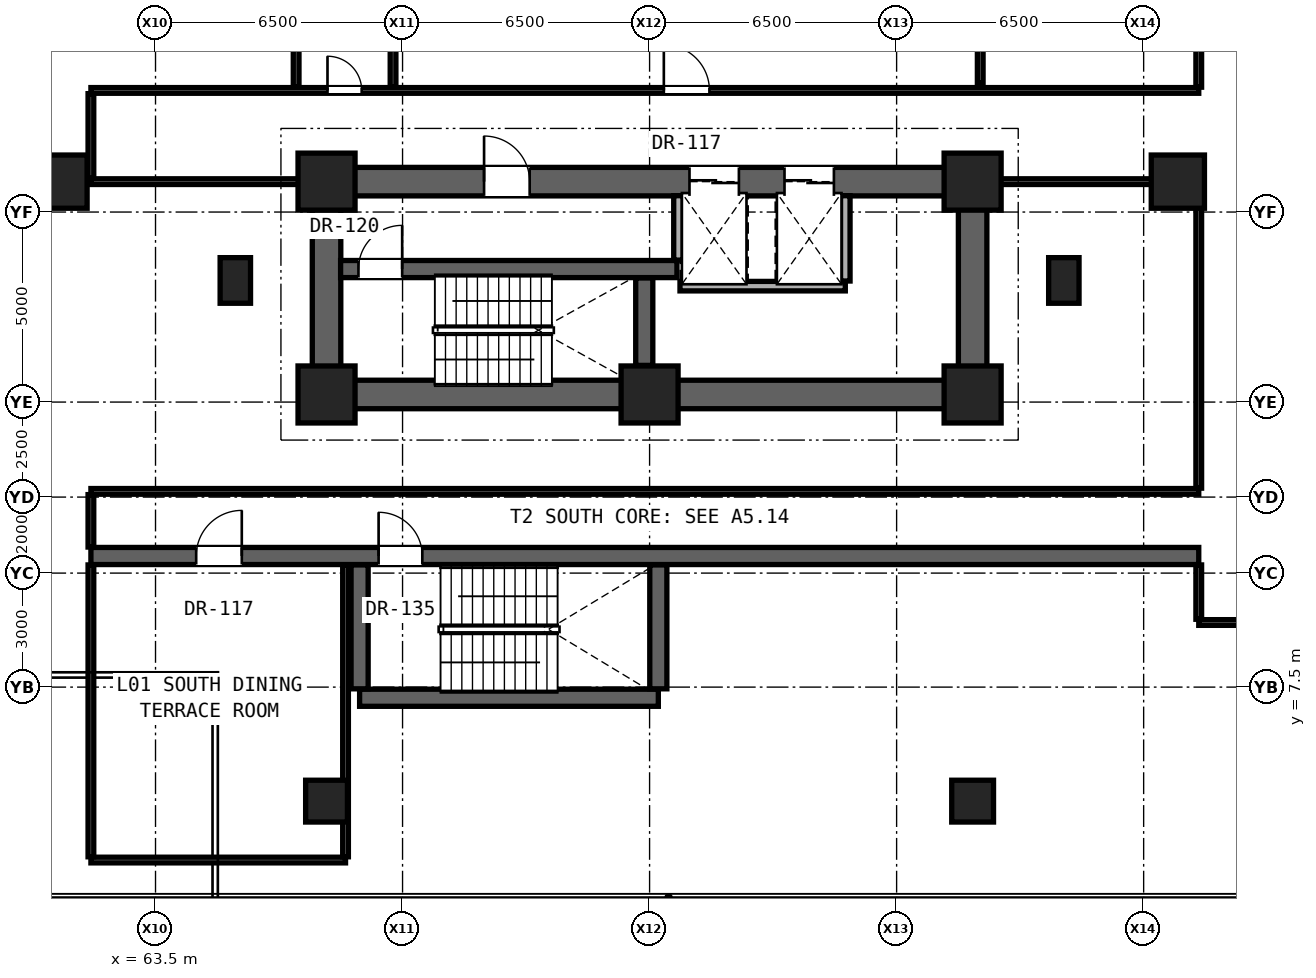
"""IFC4 building model, lengths in metres.
Left out: names, types, materials, properties, quantities, classifications, styles, units other than length and angle.
Written with IfcOpenShell. Run it as: python <this file> out.ifc"""

import sys

from ifc_helpers import new_model, si_unit, direction, frame, frame_2d, origin, origin_2d, place, context, subcontext, project, spatial, rectangle, hollow_rectangle, extrude, element, fill, save


model = new_model("IFC4")
c1 = context("Model", 3, precision=1e-05, world=origin(), true_north=direction((0.0, 1.0)))
c2 = subcontext(c1, "Body", "Model", "MODEL_VIEW")
j1 = project(units=[si_unit("LENGTHUNIT", "METRE"), si_unit("PLANEANGLEUNIT", "RADIAN")], contexts=[c1])
p1 = place(None, origin())
s1 = spatial("IfcSite", under=j1, at=p1, CompositionType="ELEMENT")
p2 = place(p1, origin())
s2 = spatial("IfcBuilding", under=s1, at=p2, CompositionType="ELEMENT")
p3 = place(p2, frame((0.0, 0.0, 5.2)))
s3 = spatial("IfcBuildingStorey", under=s2, at=p3, CompositionType="ELEMENT", Elevation=5.2)
for number, where, z_axis, x_axis in (
    (1, (68.0, 15.2, 0.0), (0.0, 0.0, 1.0), (1.0, 0.0, 0.0)),
    (2, (76.5, 15.2, 0.0), (0.0, 0.0, 1.0), (1.0, 0.0, 0.0)),
    (3, (85.0, 15.2, 0.0), (0.0, 0.0, 1.0), (1.0, 0.0, 0.0)),
    (4, (68.0, 20.8, 0.0), (0.0, 0.0, 1.0), (1.0, 0.0, 0.0)),
    (5, (85.0, 20.8, 0.0), (0.0, 0.0, 1.0), (1.0, 0.0, 0.0)),
):
    element("IfcColumn", number, at=place(p3, frame(where, z_axis=z_axis, x_axis=x_axis)), inside=s3, PredefinedType="COLUMN", context=c2, shape_type="SweptSolid", body=[
        extrude(rectangle(XDim=1.5, YDim=1.5, at=origin_2d()), origin(), (0.0, 0.0, 1.0), 4.3),
    ])
for number, where, z_axis, x_axis in (
    (6, (61.0, 20.8, 0.0), (0.0, 0.0, 1.0), (1.0, 0.0, 0.0)),
    (7, (90.4, 20.8, 0.0), (0.0, 0.0, 1.0), (1.0, 0.0, 0.0)),
):
    element("IfcColumn", number, at=place(p3, frame(where, z_axis=z_axis, x_axis=x_axis)), inside=s3, PredefinedType="COLUMN", context=c2, shape_type="SweptSolid", body=[
        extrude(hollow_rectangle(XDim=1.4, YDim=1.4, WallThickness=0.08, at=origin_2d()), origin(), (0.0, 0.0, 1.0), 4.3),
    ])
for number, where, z_axis, x_axis in (
    (8, (65.6, 18.2, 0.0), (0.0, 0.0, 1.0), (1.0, 0.0, 0.0)),
    (9, (87.4, 18.2, 0.0), (0.0, 0.0, 1.0), (1.0, 0.0, 0.0)),
):
    element("IfcColumn", number, at=place(p3, frame(where, z_axis=z_axis, x_axis=x_axis)), inside=s3, PredefinedType="PILASTER", context=c2, shape_type="SweptSolid", body=[
        extrude(rectangle(XDim=0.8, YDim=1.2, at=origin_2d()), origin(), (0.0, 0.0, 1.0), 4.3),
    ])
p4 = place(p3, frame((68.0, 15.2, 0.0), z_axis=(0.0, 0.0, 1.0), x_axis=(1.0, 0.0, 0.0)))
e10 = element("IfcWall", 10, at=p4, inside=s3, PredefinedType="SHEAR", context=c2, shape_type="SweptSolid", body=[
    extrude(rectangle(XDim=17.0, YDim=0.75, at=frame_2d((8.5, 0.0))), origin(), (0.0, 0.0, 1.0), 3.98),
])
for number, where, z_axis, x_axis in (
    (11, (68.0, 15.2, 0.0), (0.0, 0.0, 1.0), (0.0, 1.0, 0.0)),
    (12, (85.0, 15.2, 0.0), (0.0, 0.0, 1.0), (0.0, 1.0, 0.0)),
):
    element("IfcWall", number, at=place(p3, frame(where, z_axis=z_axis, x_axis=x_axis)), inside=s3, PredefinedType="SHEAR", context=c2, shape_type="SweptSolid", body=[
        extrude(rectangle(XDim=5.6, YDim=0.75, at=frame_2d((2.8, 0.0))), origin(), (0.0, 0.0, 1.0), 3.98),
    ])
p5 = place(p3, frame((68.0, 20.8, 0.0), z_axis=(0.0, 0.0, 1.0), x_axis=(1.0, 0.0, 0.0)))
e13 = element("IfcWall", 13, at=p5, inside=s3, PredefinedType="SHEAR", context=c2, shape_type="SweptSolid", body=[
    extrude(rectangle(XDim=17.0, YDim=0.75, at=frame_2d((8.5, 0.0))), origin(), (0.0, 0.0, 1.0), 3.98),
])
p6 = place(p5, frame((4.145, 0.0, 0.0)))
e14 = element("IfcOpeningElement", 14, at=p6, cuts=e13, PredefinedType="OPENING", context=c2, shape_type="SweptSolid", body=[
    extrude(rectangle(XDim=1.2, YDim=2.25, at=frame_2d((0.6, 1.125))), frame((0.0, 0.385, 0.0), z_axis=(0.0, -1.0, 0.0), x_axis=(1.0, 0.0, 0.0)), (0.0, 0.0, 1.0), 0.77),
])
p7 = place(p5, frame((9.55, 0.0, 0.0)))
e15 = element("IfcOpeningElement", 15, at=p7, cuts=e13, PredefinedType="OPENING", context=c2, shape_type="SweptSolid", body=[
    extrude(rectangle(XDim=1.3, YDim=2.3, at=frame_2d((0.65, 1.15))), frame((0.0, 0.385, 0.0), z_axis=(0.0, -1.0, 0.0), x_axis=(1.0, 0.0, 0.0)), (0.0, 0.0, 1.0), 0.77),
])
p8 = place(p5, frame((12.05, 0.0, 0.0)))
e16 = element("IfcOpeningElement", 16, at=p8, cuts=e13, PredefinedType="OPENING", context=c2, shape_type="SweptSolid", body=[
    extrude(rectangle(XDim=1.3, YDim=2.3, at=frame_2d((0.65, 1.15))), frame((0.0, 0.385, 0.0), z_axis=(0.0, -1.0, 0.0), x_axis=(1.0, 0.0, 0.0)), (0.0, 0.0, 1.0), 0.77),
])
for number, where, z_axis, x_axis in (
    (17, (68.0, 4.5, 0.0), (0.0, 0.0, 1.0), (1.0, 0.0, 0.0)),
    (18, (85.0, 4.5, 0.0), (0.0, 0.0, 1.0), (1.0, 0.0, 0.0)),
):
    element("IfcColumn", number, at=place(p3, frame(where, z_axis=z_axis, x_axis=x_axis)), inside=s3, PredefinedType="COLUMN", context=c2, shape_type="SweptSolid", body=[
        extrude(rectangle(XDim=1.1, YDim=1.1, at=origin_2d()), origin(), (0.0, 0.0, 1.0), 4.3),
    ])
p9 = place(p3, frame((61.8, 2.95, 0.0), z_axis=(0.0, 0.0, 1.0), x_axis=(1.0, 0.0, 0.0)))
e19 = element("IfcWall", 19, at=p9, inside=s3, PredefinedType="PARTITIONING", context=c2, shape_type="SweptSolid", body=[
    extrude(rectangle(XDim=6.7, YDim=0.15, at=frame_2d((3.35, 0.0))), origin(), (0.0, 0.0, 1.0), 3.98),
])
p10 = place(p3, frame((68.87, 7.22, 0.0), z_axis=(0.0, 0.0, 1.0), x_axis=(1.0, 0.0, 0.0)))
e20 = element("IfcWall", 20, at=p10, inside=s3, PredefinedType="SHEAR", context=c2, shape_type="SweptSolid", body=[
    extrude(rectangle(XDim=7.86, YDim=0.45, at=frame_2d((3.93, 0.0))), origin(), (0.0, 0.0, 1.0), 3.98),
])
p11 = place(p3, frame((90.95, 9.2, 0.0), z_axis=(0.0, 0.0, 1.0), x_axis=(1.0, 0.0, 0.0)))
e21 = element("IfcWall", 21, at=p11, inside=s3, PredefinedType="PARTITIONING", context=c2, shape_type="SweptSolid", body=[
    extrude(rectangle(XDim=1.7, YDim=0.15, at=frame_2d((0.85, 0.0))), origin(), (0.0, 0.0, 1.0), 3.98),
])
p12 = place(p3, frame((61.8, 10.95, 0.0), z_axis=(0.0, 0.0, 1.0), x_axis=(1.0, 0.0, 0.0)))
e22 = element("IfcWall", 22, at=p12, inside=s3, PredefinedType="SHEAR", context=c2, shape_type="SweptSolid", body=[
    extrude(rectangle(XDim=29.15, YDim=0.45, at=frame_2d((14.575, 0.0))), origin(), (0.0, 0.0, 1.0), 3.98),
])
p13 = place(p12, frame((7.57, 0.0, 0.0)))
e23 = element("IfcOpeningElement", 23, at=p13, cuts=e22, PredefinedType="OPENING", context=c2, shape_type="SweptSolid", body=[
    extrude(rectangle(XDim=1.15, YDim=2.2, at=frame_2d((0.575, 1.1))), frame((0.0, 0.235, 0.0), z_axis=(0.0, -1.0, 0.0), x_axis=(1.0, 0.0, 0.0)), (0.0, 0.0, 1.0), 0.47),
])
p14 = place(p12, frame((2.77, 0.0, 0.0)))
e24 = element("IfcOpeningElement", 24, at=p14, cuts=e22, PredefinedType="OPENING", context=c2, shape_type="SweptSolid", body=[
    extrude(rectangle(XDim=1.2, YDim=2.25, at=frame_2d((0.6, 1.125))), frame((0.0, 0.235, 0.0), z_axis=(0.0, -1.0, 0.0), x_axis=(1.0, 0.0, 0.0)), (0.0, 0.0, 1.0), 0.47),
])
p15 = place(p3, frame((61.8, 12.65, 0.0), z_axis=(0.0, 0.0, 1.0), x_axis=(1.0, 0.0, 0.0)))
e25 = element("IfcWall", 25, at=p15, inside=s3, PredefinedType="PARTITIONING", context=c2, shape_type="SweptSolid", body=[
    extrude(rectangle(XDim=29.15, YDim=0.15, at=frame_2d((14.575, 0.0))), origin(), (0.0, 0.0, 1.0), 3.116),
])
p16 = place(p3, frame((77.3, 18.05, 0.0), z_axis=(0.0, 0.0, 1.0), x_axis=(1.0, 0.0, 0.0)))
e26 = element("IfcWall", 26, at=p16, inside=s3, PredefinedType="SOLIDWALL", context=c2, shape_type="SweptSolid", body=[
    extrude(rectangle(XDim=4.35, YDim=0.25, at=frame_2d((2.175, 0.0))), origin(), (0.0, 0.0, 1.0), 3.98),
])
p17 = place(p3, frame((68.37, 18.5, 0.0), z_axis=(0.0, 0.0, 1.0), x_axis=(1.0, 0.0, 0.0)))
e27 = element("IfcWall", 27, at=p17, inside=s3, PredefinedType="SHEAR", context=c2, shape_type="SweptSolid", body=[
    extrude(rectangle(XDim=8.85, YDim=0.45, at=frame_2d((4.425, 0.0))), origin(), (0.0, 0.0, 1.0), 3.98),
])
p18 = place(p17, frame((0.47, 0.0, 0.0)))
e28 = element("IfcOpeningElement", 28, at=p18, cuts=e27, PredefinedType="OPENING", context=c2, shape_type="SweptSolid", body=[
    extrude(rectangle(XDim=1.15, YDim=2.2, at=frame_2d((0.575, 1.1))), frame((0.0, 0.235, 0.0), z_axis=(0.0, -1.0, 0.0), x_axis=(1.0, 0.0, 0.0)), (0.0, 0.0, 1.0), 0.47),
])
p19 = place(p3, frame((61.8, 20.8, 0.0), z_axis=(0.0, 0.0, 1.0), x_axis=(1.0, 0.0, 0.0)))
e29 = element("IfcWall", 29, at=p19, inside=s3, PredefinedType="PARTITIONING", context=c2, shape_type="SweptSolid", body=[
    extrude(rectangle(XDim=5.83, YDim=0.15, at=frame_2d((2.915, 0.0))), origin(), (0.0, 0.0, 1.0), 2.872),
])
p20 = place(p3, frame((85.37, 20.8, 0.0), z_axis=(0.0, 0.0, 1.0), x_axis=(1.0, 0.0, 0.0)))
e30 = element("IfcWall", 30, at=p20, inside=s3, PredefinedType="PARTITIONING", context=c2, shape_type="SweptSolid", body=[
    extrude(rectangle(XDim=5.58, YDim=0.15, at=frame_2d((2.79, 0.0))), origin(), (0.0, 0.0, 1.0), 2.872),
])
p21 = place(p3, frame((61.8, 23.2, 0.0), z_axis=(0.0, 0.0, 1.0), x_axis=(1.0, 0.0, 0.0)))
e31 = element("IfcWall", 31, at=p21, inside=s3, PredefinedType="PARTITIONING", context=c2, shape_type="SweptSolid", body=[
    extrude(rectangle(XDim=29.15, YDim=0.15, at=frame_2d((14.575, 0.0))), origin(), (0.0, 0.0, 1.0), 3.045),
])
p22 = place(p21, frame((6.225, 0.0, 0.0)))
e32 = element("IfcOpeningElement", 32, at=p22, cuts=e31, PredefinedType="OPENING", context=c2, shape_type="SweptSolid", body=[
    extrude(rectangle(XDim=0.9, YDim=2.1, at=frame_2d((0.45, 1.05))), frame((0.0, 0.085, 0.0), z_axis=(0.0, -1.0, 0.0), x_axis=(1.0, 0.0, 0.0)), (0.0, 0.0, 1.0), 0.17),
])
p23 = place(p21, frame((15.075, 0.0, 0.0)))
e33 = element("IfcOpeningElement", 33, at=p23, cuts=e31, PredefinedType="OPENING", context=c2, shape_type="SweptSolid", body=[
    extrude(rectangle(XDim=1.2, YDim=2.25, at=frame_2d((0.6, 1.125))), frame((0.0, 0.085, 0.0), z_axis=(0.0, -1.0, 0.0), x_axis=(1.0, 0.0, 0.0)), (0.0, 0.0, 1.0), 0.17),
])
p24 = place(p3, frame((61.8, 3.035, 0.0), z_axis=(0.0, 0.0, 1.0), x_axis=(0.0, 1.0, 0.0)))
e34 = element("IfcWall", 34, at=p24, inside=s3, PredefinedType="PARTITIONING", context=c2, shape_type="SweptSolid", body=[
    extrude(rectangle(XDim=7.68, YDim=0.15, at=frame_2d((3.84, 0.0))), origin(), (0.0, 0.0, 1.0), 3.199),
])
p25 = place(p3, frame((61.8, 11.185, 0.0), z_axis=(0.0, 0.0, 1.0), x_axis=(0.0, 1.0, 0.0)))
e35 = element("IfcWall", 35, at=p25, inside=s3, PredefinedType="PARTITIONING", context=c2, shape_type="SweptSolid", body=[
    extrude(rectangle(XDim=1.38, YDim=0.15, at=frame_2d((0.69, 0.0))), origin(), (0.0, 0.0, 1.0), 3.98),
])
p26 = place(p3, frame((61.8, 20.885, 0.0), z_axis=(0.0, 0.0, 1.0), x_axis=(0.0, 1.0, 0.0)))
e36 = element("IfcWall", 36, at=p26, inside=s3, PredefinedType="PARTITIONING", context=c2, shape_type="SweptSolid", body=[
    extrude(rectangle(XDim=2.23, YDim=0.15, at=frame_2d((1.115, 0.0))), origin(), (0.0, 0.0, 1.0), 2.872),
])
p27 = place(p3, frame((67.2, 23.285, 0.0), z_axis=(0.0, 0.0, 1.0), x_axis=(0.0, 1.0, 0.0)))
e37 = element("IfcWall", 37, at=p27, inside=s3, PredefinedType="PARTITIONING", context=c2, shape_type="SweptSolid", body=[
    extrude(rectangle(XDim=2.43, YDim=0.15, at=frame_2d((1.215, 0.0))), origin(), (0.0, 0.0, 1.0), 3.98),
])
p28 = place(p3, frame((68.5, 3.035, 0.0), z_axis=(0.0, 0.0, 1.0), x_axis=(0.0, 1.0, 0.0)))
e38 = element("IfcWall", 38, at=p28, inside=s3, PredefinedType="PARTITIONING", context=c2, shape_type="SweptSolid", body=[
    extrude(rectangle(XDim=7.68, YDim=0.15, at=frame_2d((3.84, 0.0))), origin(), (0.0, 0.0, 1.0), 3.116),
])
p29 = place(p3, frame((68.87, 7.455, 0.0), z_axis=(0.0, 0.0, 1.0), x_axis=(0.0, 1.0, 0.0)))
e39 = element("IfcWall", 39, at=p29, inside=s3, PredefinedType="SHEAR", context=c2, shape_type="SweptSolid", body=[
    extrude(rectangle(XDim=3.26, YDim=0.45, at=frame_2d((1.63, 0.0))), origin(), (0.0, 0.0, 1.0), 3.98),
])
p30 = place(p3, frame((69.75, 23.285, 0.0), z_axis=(0.0, 0.0, 1.0), x_axis=(0.0, 1.0, 0.0)))
e40 = element("IfcWall", 40, at=p30, inside=s3, PredefinedType="PARTITIONING", context=c2, shape_type="SweptSolid", body=[
    extrude(rectangle(XDim=2.43, YDim=0.15, at=frame_2d((1.215, 0.0))), origin(), (0.0, 0.0, 1.0), 3.98),
])
p31 = place(p3, frame((76.36, 15.965, 0.0), z_axis=(0.0, 0.0, 1.0), x_axis=(0.0, 1.0, 0.0)))
e41 = element("IfcWall", 41, at=p31, inside=s3, PredefinedType="SHEAR", context=c2, shape_type="SweptSolid", body=[
    extrude(rectangle(XDim=2.3, YDim=0.45, at=frame_2d((1.15, 0.0))), origin(), (0.0, 0.0, 1.0), 3.98),
])
p32 = place(p3, frame((76.73, 7.455, 0.0), z_axis=(0.0, 0.0, 1.0), x_axis=(0.0, 1.0, 0.0)))
e42 = element("IfcWall", 42, at=p32, inside=s3, PredefinedType="SHEAR", context=c2, shape_type="SweptSolid", body=[
    extrude(rectangle(XDim=3.26, YDim=0.45, at=frame_2d((1.63, 0.0))), origin(), (0.0, 0.0, 1.0), 3.98),
])
p33 = place(p3, frame((77.26, 18.735, 0.0), z_axis=(0.0, 0.0, 1.0), x_axis=(0.0, 1.0, 0.0)))
e43 = element("IfcWall", 43, at=p33, inside=s3, PredefinedType="SOLIDWALL", context=c2, shape_type="SweptSolid", body=[
    extrude(rectangle(XDim=1.695, YDim=0.25, at=frame_2d((0.847, 0.0))), origin(), (0.0, 0.0, 1.0), 3.98),
])
p34 = place(p3, frame((81.65, 18.185, 0.0), z_axis=(0.0, 0.0, 1.0), x_axis=(0.0, 1.0, 0.0)))
e44 = element("IfcWall", 44, at=p34, inside=s3, PredefinedType="SOLIDWALL", context=c2, shape_type="SweptSolid", body=[
    extrude(rectangle(XDim=2.245, YDim=0.25, at=frame_2d((1.123, 0.0))), origin(), (0.0, 0.0, 1.0), 3.98),
])
p35 = place(p3, frame((85.2, 23.4, 0.0), z_axis=(0.0, 0.0, 1.0), x_axis=(0.0, 1.0, 0.0)))
e45 = element("IfcWall", 45, at=p35, inside=s3, PredefinedType="PARTITIONING", context=c2, shape_type="SweptSolid", body=[
    extrude(rectangle(XDim=5.715, YDim=0.15, at=frame_2d((2.857, 0.0))), origin(), (0.0, 0.0, 1.0), 3.045),
])
p36 = place(p3, frame((90.95, 9.285, 0.0), z_axis=(0.0, 0.0, 1.0), x_axis=(0.0, 1.0, 0.0)))
e46 = element("IfcWall", 46, at=p36, inside=s3, PredefinedType="PARTITIONING", context=c2, shape_type="SweptSolid", body=[
    extrude(rectangle(XDim=1.43, YDim=0.15, at=frame_2d((0.715, 0.0))), origin(), (0.0, 0.0, 1.0), 3.98),
])
p37 = place(p3, frame((90.95, 12.735, 0.0), z_axis=(0.0, 0.0, 1.0), x_axis=(0.0, 1.0, 0.0)))
e47 = element("IfcWall", 47, at=p37, inside=s3, PredefinedType="PARTITIONING", context=c2, shape_type="SweptSolid", body=[
    extrude(rectangle(XDim=7.98, YDim=0.15, at=frame_2d((3.99, 0.0))), origin(), (0.0, 0.0, 1.0), 3.116),
])
p38 = place(p3, frame((90.95, 23.285, 0.0), z_axis=(0.0, 0.0, 1.0), x_axis=(0.0, 1.0, 0.0)))
e48 = element("IfcWall", 48, at=p38, inside=s3, PredefinedType="PARTITIONING", context=c2, shape_type="SweptSolid", body=[
    extrude(rectangle(XDim=6.03, YDim=0.15, at=frame_2d((3.015, 0.0))), origin(), (0.0, 0.0, 1.0), 3.199),
])
p39 = place(p6, origin())
e49 = element("IfcDoor", 49, at=p39, inside=s3, OperationType="SINGLE_SWING_LEFT", PredefinedType="DOOR", context=c2, shape_type="SweptSolid", body=[
    extrude(rectangle(XDim=1.2, YDim=2.25, at=frame_2d((0.6, 1.125))), frame((0.0, 0.025, 0.0), z_axis=(0.0, -1.0, 0.0), x_axis=(1.0, 0.0, 0.0)), (0.0, 0.0, 1.0), 0.05),
])
fill(e14, e49)
p40 = place(p18, origin())
e50 = element("IfcDoor", 50, at=p40, inside=s3, OperationType="SINGLE_SWING_RIGHT", PredefinedType="DOOR", context=c2, shape_type="SweptSolid", body=[
    extrude(rectangle(XDim=1.15, YDim=2.2, at=frame_2d((0.575, 1.1))), frame((0.0, 0.025, 0.0), z_axis=(0.0, -1.0, 0.0), x_axis=(1.0, 0.0, 0.0)), (0.0, 0.0, 1.0), 0.05),
])
fill(e28, e50)
p41 = place(p22, origin())
e51 = element("IfcDoor", 51, at=p41, inside=s3, OperationType="SINGLE_SWING_LEFT", PredefinedType="DOOR", context=c2, shape_type="SweptSolid", body=[
    extrude(rectangle(XDim=0.9, YDim=2.1, at=frame_2d((0.45, 1.05))), frame((0.0, 0.025, 0.0), z_axis=(0.0, -1.0, 0.0), x_axis=(1.0, 0.0, 0.0)), (0.0, 0.0, 1.0), 0.05),
])
fill(e32, e51)
p42 = place(p13, origin())
e52 = element("IfcDoor", 52, at=p42, inside=s3, OperationType="SINGLE_SWING_LEFT", PredefinedType="DOOR", context=c2, shape_type="SweptSolid", body=[
    extrude(rectangle(XDim=1.15, YDim=2.2, at=frame_2d((0.575, 1.1))), frame((0.0, 0.025, 0.0), z_axis=(0.0, -1.0, 0.0), x_axis=(1.0, 0.0, 0.0)), (0.0, 0.0, 1.0), 0.05),
])
fill(e23, e52)
p43 = place(p23, origin())
e53 = element("IfcDoor", 53, at=p43, inside=s3, OperationType="SINGLE_SWING_LEFT", PredefinedType="DOOR", context=c2, shape_type="SweptSolid", body=[
    extrude(rectangle(XDim=1.2, YDim=2.25, at=frame_2d((0.6, 1.125))), frame((0.0, 0.025, 0.0), z_axis=(0.0, -1.0, 0.0), x_axis=(1.0, 0.0, 0.0)), (0.0, 0.0, 1.0), 0.05),
])
fill(e33, e53)
p44 = place(p14, origin())
e54 = element("IfcDoor", 54, at=p44, inside=s3, OperationType="SINGLE_SWING_RIGHT", PredefinedType="DOOR", context=c2, shape_type="SweptSolid", body=[
    extrude(rectangle(XDim=1.2, YDim=2.25, at=frame_2d((0.6, 1.125))), frame((0.0, 0.025, 0.0), z_axis=(0.0, -1.0, 0.0), x_axis=(1.0, 0.0, 0.0)), (0.0, 0.0, 1.0), 0.05),
])
fill(e24, e54)
p45 = place(p7, origin())
e55 = element("IfcDoor", 55, at=p45, inside=s3, OperationType="DOUBLE_DOOR_SLIDING", PredefinedType="DOOR", context=c2, shape_type="SweptSolid", body=[
    extrude(rectangle(XDim=1.3, YDim=2.3, at=frame_2d((0.65, 1.15))), frame((0.0, 0.025, 0.0), z_axis=(0.0, -1.0, 0.0), x_axis=(1.0, 0.0, 0.0)), (0.0, 0.0, 1.0), 0.05),
])
fill(e15, e55)
p46 = place(p8, origin())
e56 = element("IfcDoor", 56, at=p46, inside=s3, OperationType="DOUBLE_DOOR_SLIDING", PredefinedType="DOOR", context=c2, shape_type="SweptSolid", body=[
    extrude(rectangle(XDim=1.3, YDim=2.3, at=frame_2d((0.65, 1.15))), frame((0.0, 0.025, 0.0), z_axis=(0.0, -1.0, 0.0), x_axis=(1.0, 0.0, 0.0)), (0.0, 0.0, 1.0), 0.05),
])
fill(e16, e56)
save(model, sys.argv[1])
